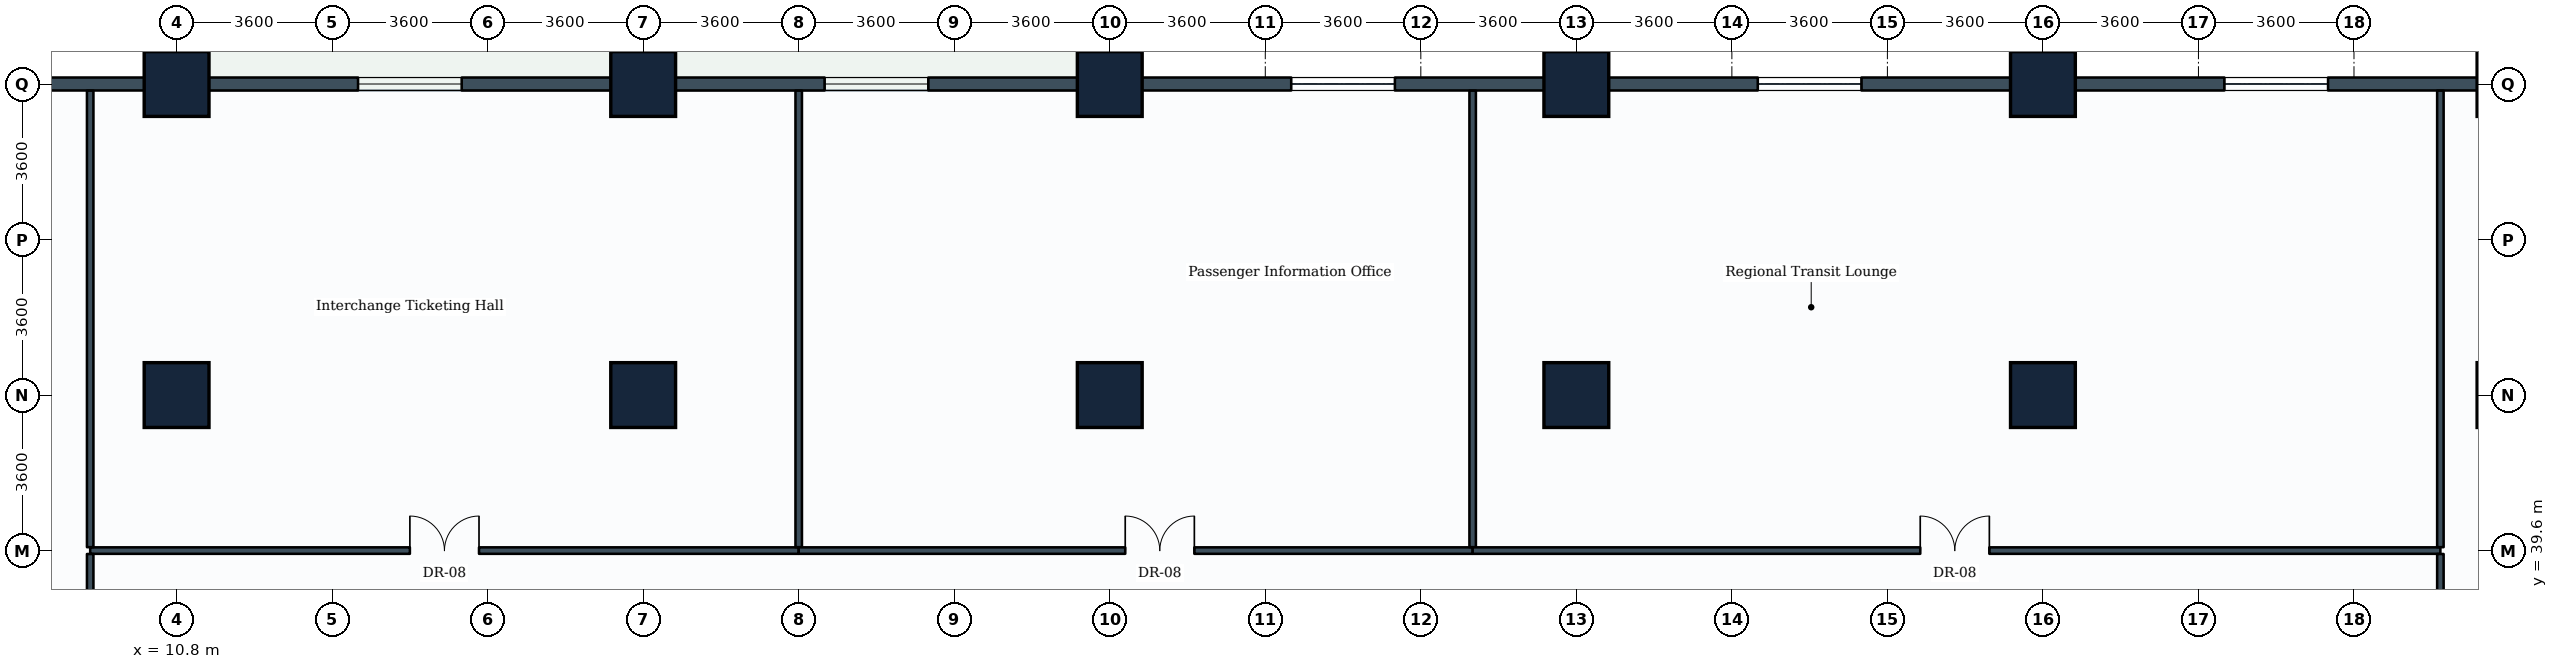
"""IFC4 building model, lengths in metres.
Left out: names, types, materials, properties, quantities, classifications, styles, units other than length and angle.
Written with IfcOpenShell. Run it as: python <this file> out.ifc"""

import sys

from ifc_helpers import new_model, si_unit, direction, frame, frame_2d, origin, origin_2d, place, context, subcontext, project, spatial, rectangle, extrude, element, fill, save


model = new_model("IFC4")
c1 = context("Model", 3, precision=1e-05, world=origin(), true_north=direction((0.0, 1.0)))
c2 = subcontext(c1, "Body", "Model", "MODEL_VIEW")
j1 = project(units=[si_unit("LENGTHUNIT", "METRE"), si_unit("PLANEANGLEUNIT", "RADIAN")], contexts=[c1])
p1 = place(None, origin())
s1 = spatial("IfcSite", under=j1, at=p1, CompositionType="ELEMENT")
p2 = place(p1, origin())
s2 = spatial("IfcBuilding", under=s1, at=p2, CompositionType="ELEMENT")
p3 = place(p2, frame((0.0, 0.0, 5.4)))
s3 = spatial("IfcBuildingStorey", under=s2, at=p3, CompositionType="ELEMENT", Elevation=5.4)
for number, where, z_axis, x_axis in (
    (1, (10.8, 43.2, 0.0), (0.0, 0.0, 1.0), (1.0, 0.0, 0.0)),
    (2, (10.8, 50.4, 0.0), (0.0, 0.0, 1.0), (1.0, 0.0, 0.0)),
    (3, (21.6, 43.2, 0.0), (0.0, 0.0, 1.0), (1.0, 0.0, 0.0)),
    (4, (21.6, 50.4, 0.0), (0.0, 0.0, 1.0), (1.0, 0.0, 0.0)),
    (5, (32.4, 43.2, 0.0), (0.0, 0.0, 1.0), (1.0, 0.0, 0.0)),
    (6, (32.4, 50.4, 0.0), (0.0, 0.0, 1.0), (1.0, 0.0, 0.0)),
    (7, (43.2, 43.2, 0.0), (0.0, 0.0, 1.0), (1.0, 0.0, 0.0)),
    (8, (43.2, 50.4, 0.0), (0.0, 0.0, 1.0), (1.0, 0.0, 0.0)),
    (9, (54.0, 43.2, 0.0), (0.0, 0.0, 1.0), (1.0, 0.0, 0.0)),
    (10, (54.0, 50.4, 0.0), (0.0, 0.0, 1.0), (1.0, 0.0, 0.0)),
    (11, (64.8, 43.2, 0.0), (0.0, 0.0, 1.0), (1.0, 0.0, 0.0)),
    (12, (64.8, 50.4, 0.0), (0.0, 0.0, 1.0), (1.0, 0.0, 0.0)),
):
    element("IfcColumn", number, at=place(p3, frame(where, z_axis=z_axis, x_axis=x_axis)), inside=s3, PredefinedType="COLUMN", context=c2, shape_type="SweptSolid", body=[
        extrude(rectangle(XDim=1.5, YDim=1.5, at=origin_2d()), origin(), (0.0, 0.0, 1.0), 4.8),
    ])
p4 = place(p3, frame((0.0, 50.4, 0.0), z_axis=(0.0, 0.0, 1.0), x_axis=(1.0, 0.0, 0.0)))
e13 = element("IfcWall", 13, at=p4, inside=s3, PredefinedType="STANDARD", context=c2, shape_type="SweptSolid", body=[
    extrude(rectangle(XDim=10.8, YDim=0.3, at=frame_2d((5.4, 0.0))), origin(), (0.0, 0.0, 1.0), 3.83),
])
p5 = place(p4, frame((4.2, 0.0, 0.85)))
e14 = element("IfcOpeningElement", 14, at=p5, cuts=e13, PredefinedType="OPENING", context=c2, shape_type="SweptSolid", body=[
    extrude(rectangle(XDim=2.4, YDim=1.6, at=frame_2d((1.2, 0.8))), frame((0.0, 0.16, 0.0), z_axis=(0.0, -1.0, 0.0), x_axis=(1.0, 0.0, 0.0)), (0.0, 0.0, 1.0), 0.32),
])
p6 = place(p3, frame((10.8, 50.4, 0.0), z_axis=(0.0, 0.0, 1.0), x_axis=(1.0, 0.0, 0.0)))
e15 = element("IfcWall", 15, at=p6, inside=s3, PredefinedType="STANDARD", context=c2, shape_type="SweptSolid", body=[
    extrude(rectangle(XDim=10.8, YDim=0.3, at=frame_2d((5.4, 0.0))), origin(), (0.0, 0.0, 1.0), 3.83),
])
p7 = place(p6, frame((4.2, 0.0, 0.85)))
e16 = element("IfcOpeningElement", 16, at=p7, cuts=e15, PredefinedType="OPENING", context=c2, shape_type="SweptSolid", body=[
    extrude(rectangle(XDim=2.4, YDim=1.6, at=frame_2d((1.2, 0.8))), frame((0.0, 0.16, 0.0), z_axis=(0.0, -1.0, 0.0), x_axis=(1.0, 0.0, 0.0)), (0.0, 0.0, 1.0), 0.32),
])
p8 = place(p3, frame((21.6, 50.4, 0.0), z_axis=(0.0, 0.0, 1.0), x_axis=(1.0, 0.0, 0.0)))
e17 = element("IfcWall", 17, at=p8, inside=s3, PredefinedType="STANDARD", context=c2, shape_type="SweptSolid", body=[
    extrude(rectangle(XDim=10.8, YDim=0.3, at=frame_2d((5.4, 0.0))), origin(), (0.0, 0.0, 1.0), 3.83),
])
p9 = place(p8, frame((4.2, 0.0, 0.85)))
e18 = element("IfcOpeningElement", 18, at=p9, cuts=e17, PredefinedType="OPENING", context=c2, shape_type="SweptSolid", body=[
    extrude(rectangle(XDim=2.4, YDim=1.6, at=frame_2d((1.2, 0.8))), frame((0.0, 0.16, 0.0), z_axis=(0.0, -1.0, 0.0), x_axis=(1.0, 0.0, 0.0)), (0.0, 0.0, 1.0), 0.32),
])
p10 = place(p3, frame((32.4, 50.4, 0.0), z_axis=(0.0, 0.0, 1.0), x_axis=(1.0, 0.0, 0.0)))
e19 = element("IfcWall", 19, at=p10, inside=s3, PredefinedType="STANDARD", context=c2, shape_type="SweptSolid", body=[
    extrude(rectangle(XDim=10.8, YDim=0.3, at=frame_2d((5.4, 0.0))), origin(), (0.0, 0.0, 1.0), 3.83),
])
p11 = place(p10, frame((4.2, 0.0, 0.85)))
e20 = element("IfcOpeningElement", 20, at=p11, cuts=e19, PredefinedType="OPENING", context=c2, shape_type="SweptSolid", body=[
    extrude(rectangle(XDim=2.4, YDim=1.6, at=frame_2d((1.2, 0.8))), frame((0.0, 0.16, 0.0), z_axis=(0.0, -1.0, 0.0), x_axis=(1.0, 0.0, 0.0)), (0.0, 0.0, 1.0), 0.32),
])
p12 = place(p3, frame((43.2, 50.4, 0.0), z_axis=(0.0, 0.0, 1.0), x_axis=(1.0, 0.0, 0.0)))
e21 = element("IfcWall", 21, at=p12, inside=s3, PredefinedType="STANDARD", context=c2, shape_type="SweptSolid", body=[
    extrude(rectangle(XDim=10.8, YDim=0.3, at=frame_2d((5.4, 0.0))), origin(), (0.0, 0.0, 1.0), 3.83),
])
p13 = place(p12, frame((4.2, 0.0, 0.85)))
e22 = element("IfcOpeningElement", 22, at=p13, cuts=e21, PredefinedType="OPENING", context=c2, shape_type="SweptSolid", body=[
    extrude(rectangle(XDim=2.4, YDim=1.6, at=frame_2d((1.2, 0.8))), frame((0.0, 0.16, 0.0), z_axis=(0.0, -1.0, 0.0), x_axis=(1.0, 0.0, 0.0)), (0.0, 0.0, 1.0), 0.32),
])
p14 = place(p3, frame((54.0, 50.4, 0.0), z_axis=(0.0, 0.0, 1.0), x_axis=(1.0, 0.0, 0.0)))
e23 = element("IfcWall", 23, at=p14, inside=s3, PredefinedType="STANDARD", context=c2, shape_type="SweptSolid", body=[
    extrude(rectangle(XDim=10.8, YDim=0.3, at=frame_2d((5.4, 0.0))), origin(), (0.0, 0.0, 1.0), 3.83),
])
p15 = place(p14, frame((4.2, 0.0, 0.85)))
e24 = element("IfcOpeningElement", 24, at=p15, cuts=e23, PredefinedType="OPENING", context=c2, shape_type="SweptSolid", body=[
    extrude(rectangle(XDim=2.4, YDim=1.6, at=frame_2d((1.2, 0.8))), frame((0.0, 0.16, 0.0), z_axis=(0.0, -1.0, 0.0), x_axis=(1.0, 0.0, 0.0)), (0.0, 0.0, 1.0), 0.32),
])
p16 = place(p3, frame((8.8, 39.6, 0.0), z_axis=(0.0, 0.0, 1.0), x_axis=(1.0, 0.0, 0.0)))
e25 = element("IfcWall", 25, at=p16, inside=s3, PredefinedType="PARTITIONING", context=c2, shape_type="SweptSolid", body=[
    extrude(rectangle(XDim=16.4, YDim=0.15, at=frame_2d((8.2, 0.0))), origin(), (0.0, 0.0, 1.0), 3.83),
])
p17 = place(p16, frame((7.4, 0.0, 0.0)))
e26 = element("IfcOpeningElement", 26, at=p17, cuts=e25, PredefinedType="OPENING", context=c2, shape_type="SweptSolid", body=[
    extrude(rectangle(XDim=1.6, YDim=2.2, at=frame_2d((0.8, 1.1))), frame((0.0, 0.085, 0.0), z_axis=(0.0, -1.0, 0.0), x_axis=(1.0, 0.0, 0.0)), (0.0, 0.0, 1.0), 0.17),
])
p18 = place(p3, frame((25.2, 39.679, 0.0), z_axis=(0.0, 0.0, 1.0), x_axis=(0.0, 1.0, 0.0)))
e27 = element("IfcWall", 27, at=p18, inside=s3, PredefinedType="PARTITIONING", context=c2, shape_type="SweptSolid", body=[
    extrude(rectangle(XDim=10.567, YDim=0.15, at=frame_2d((5.284, 0.0))), origin(), (0.0, 0.0, 1.0), 3.83),
])
p19 = place(p3, frame((25.2, 39.6, 0.0), z_axis=(0.0, 0.0, 1.0), x_axis=(1.0, 0.0, 0.0)))
e28 = element("IfcWall", 28, at=p19, inside=s3, PredefinedType="PARTITIONING", context=c2, shape_type="SweptSolid", body=[
    extrude(rectangle(XDim=15.6, YDim=0.15, at=frame_2d((7.8, 0.0))), origin(), (0.0, 0.0, 1.0), 3.83),
])
p20 = place(p19, frame((7.558, 0.0, 0.0)))
e29 = element("IfcOpeningElement", 29, at=p20, cuts=e28, PredefinedType="OPENING", context=c2, shape_type="SweptSolid", body=[
    extrude(rectangle(XDim=1.6, YDim=2.2, at=frame_2d((0.8, 1.1))), frame((0.0, 0.085, 0.0), z_axis=(0.0, -1.0, 0.0), x_axis=(1.0, 0.0, 0.0)), (0.0, 0.0, 1.0), 0.17),
])
p21 = place(p3, frame((40.8, 39.679, 0.0), z_axis=(0.0, 0.0, 1.0), x_axis=(0.0, 1.0, 0.0)))
e30 = element("IfcWall", 30, at=p21, inside=s3, PredefinedType="PARTITIONING", context=c2, shape_type="SweptSolid", body=[
    extrude(rectangle(XDim=10.567, YDim=0.15, at=frame_2d((5.284, 0.0))), origin(), (0.0, 0.0, 1.0), 3.83),
])
p22 = place(p3, frame((40.8, 39.6, 0.0), z_axis=(0.0, 0.0, 1.0), x_axis=(1.0, 0.0, 0.0)))
e31 = element("IfcWall", 31, at=p22, inside=s3, PredefinedType="PARTITIONING", context=c2, shape_type="SweptSolid", body=[
    extrude(rectangle(XDim=22.4, YDim=0.15, at=frame_2d((11.2, 0.0))), origin(), (0.0, 0.0, 1.0), 3.83),
])
p23 = place(p22, frame((10.36, 0.0, 0.0)))
e32 = element("IfcOpeningElement", 32, at=p23, cuts=e31, PredefinedType="OPENING", context=c2, shape_type="SweptSolid", body=[
    extrude(rectangle(XDim=1.6, YDim=2.2, at=frame_2d((0.8, 1.1))), frame((0.0, 0.085, 0.0), z_axis=(0.0, -1.0, 0.0), x_axis=(1.0, 0.0, 0.0)), (0.0, 0.0, 1.0), 0.17),
])
p24 = place(p3, frame((8.8, 35.4, 0.0), z_axis=(0.0, 0.0, 1.0), x_axis=(0.0, 1.0, 0.0)))
e33 = element("IfcWall", 33, at=p24, inside=s3, PredefinedType="PARTITIONING", context=c2, shape_type="SweptSolid", body=[
    extrude(rectangle(XDim=4.121, YDim=0.15, at=frame_2d((2.061, 0.0))), origin(), (0.0, 0.0, 1.0), 4.485),
])
p25 = place(p24, frame((1.561, 0.0, 0.0)))
e34 = element("IfcOpeningElement", 34, at=p25, cuts=e33, PredefinedType="OPENING", context=c2, shape_type="SweptSolid", body=[
    extrude(rectangle(XDim=1.0, YDim=2.1, at=frame_2d((0.5, 1.05))), frame((0.0, 0.085, 0.0), z_axis=(0.0, -1.0, 0.0), x_axis=(1.0, 0.0, 0.0)), (0.0, 0.0, 1.0), 0.17),
])
p26 = place(p3, frame((8.8, 39.679, 0.0), z_axis=(0.0, 0.0, 1.0), x_axis=(0.0, 1.0, 0.0)))
e35 = element("IfcWall", 35, at=p26, inside=s3, PredefinedType="PARTITIONING", context=c2, shape_type="SweptSolid", body=[
    extrude(rectangle(XDim=10.567, YDim=0.15, at=frame_2d((5.284, 0.0))), origin(), (0.0, 0.0, 1.0), 3.83),
])
p27 = place(p3, frame((63.2, 35.8, 0.0), z_axis=(0.0, 0.0, 1.0), x_axis=(0.0, 1.0, 0.0)))
e36 = element("IfcWall", 36, at=p27, inside=s3, PredefinedType="PARTITIONING", context=c2, shape_type="SweptSolid", body=[
    extrude(rectangle(XDim=3.721, YDim=0.15, at=frame_2d((1.86, 0.0))), origin(), (0.0, 0.0, 1.0), 4.485),
])
p28 = place(p27, frame((1.4, 0.0, 0.0)))
e37 = element("IfcOpeningElement", 37, at=p28, cuts=e36, PredefinedType="OPENING", context=c2, shape_type="SweptSolid", body=[
    extrude(rectangle(XDim=1.0, YDim=2.1, at=frame_2d((0.5, 1.05))), frame((0.0, 0.085, 0.0), z_axis=(0.0, -1.0, 0.0), x_axis=(1.0, 0.0, 0.0)), (0.0, 0.0, 1.0), 0.17),
])
p29 = place(p3, frame((63.2, 39.679, 0.0), z_axis=(0.0, 0.0, 1.0), x_axis=(0.0, 1.0, 0.0)))
e38 = element("IfcWall", 38, at=p29, inside=s3, PredefinedType="PARTITIONING", context=c2, shape_type="SweptSolid", body=[
    extrude(rectangle(XDim=10.567, YDim=0.15, at=frame_2d((5.284, 0.0))), origin(), (0.0, 0.0, 1.0), 3.83),
])
p30 = place(p7, origin())
e39 = element("IfcWindow", 39, at=p30, inside=s3, PartitioningType="SINGLE_PANEL", PredefinedType="WINDOW", context=c2, shape_type="SweptSolid", body=[
    extrude(rectangle(XDim=2.4, YDim=1.6, at=frame_2d((1.2, 0.8))), frame((0.0, 0.03, 0.0), z_axis=(0.0, -1.0, 0.0), x_axis=(1.0, 0.0, 0.0)), (0.0, 0.0, 1.0), 0.06),
])
fill(e16, e39)
p31 = place(p9, origin())
e40 = element("IfcWindow", 40, at=p31, inside=s3, PartitioningType="SINGLE_PANEL", PredefinedType="WINDOW", context=c2, shape_type="SweptSolid", body=[
    extrude(rectangle(XDim=2.4, YDim=1.6, at=frame_2d((1.2, 0.8))), frame((0.0, 0.03, 0.0), z_axis=(0.0, -1.0, 0.0), x_axis=(1.0, 0.0, 0.0)), (0.0, 0.0, 1.0), 0.06),
])
fill(e18, e40)
p32 = place(p11, origin())
e41 = element("IfcWindow", 41, at=p32, inside=s3, PartitioningType="SINGLE_PANEL", PredefinedType="WINDOW", context=c2, shape_type="SweptSolid", body=[
    extrude(rectangle(XDim=2.4, YDim=1.6, at=frame_2d((1.2, 0.8))), frame((0.0, 0.03, 0.0), z_axis=(0.0, -1.0, 0.0), x_axis=(1.0, 0.0, 0.0)), (0.0, 0.0, 1.0), 0.06),
])
fill(e20, e41)
p33 = place(p13, origin())
e42 = element("IfcWindow", 42, at=p33, inside=s3, PartitioningType="SINGLE_PANEL", PredefinedType="WINDOW", context=c2, shape_type="SweptSolid", body=[
    extrude(rectangle(XDim=2.4, YDim=1.6, at=frame_2d((1.2, 0.8))), frame((0.0, 0.03, 0.0), z_axis=(0.0, -1.0, 0.0), x_axis=(1.0, 0.0, 0.0)), (0.0, 0.0, 1.0), 0.06),
])
fill(e22, e42)
p34 = place(p15, origin())
e43 = element("IfcWindow", 43, at=p34, inside=s3, PartitioningType="SINGLE_PANEL", PredefinedType="WINDOW", context=c2, shape_type="SweptSolid", body=[
    extrude(rectangle(XDim=2.4, YDim=1.6, at=frame_2d((1.2, 0.8))), frame((0.0, 0.03, 0.0), z_axis=(0.0, -1.0, 0.0), x_axis=(1.0, 0.0, 0.0)), (0.0, 0.0, 1.0), 0.06),
])
fill(e24, e43)
p35 = place(p17, origin())
e44 = element("IfcDoor", 44, at=p35, inside=s3, OperationType="DOUBLE_DOOR_SINGLE_SWING", PredefinedType="DOOR", context=c2, shape_type="SweptSolid", body=[
    extrude(rectangle(XDim=1.6, YDim=2.2, at=frame_2d((0.8, 1.1))), frame((0.0, 0.025, 0.0), z_axis=(0.0, -1.0, 0.0), x_axis=(1.0, 0.0, 0.0)), (0.0, 0.0, 1.0), 0.05),
])
fill(e26, e44)
p36 = place(p20, origin())
e45 = element("IfcDoor", 45, at=p36, inside=s3, OperationType="DOUBLE_DOOR_SINGLE_SWING", PredefinedType="DOOR", context=c2, shape_type="SweptSolid", body=[
    extrude(rectangle(XDim=1.6, YDim=2.2, at=frame_2d((0.8, 1.1))), frame((0.0, 0.025, 0.0), z_axis=(0.0, -1.0, 0.0), x_axis=(1.0, 0.0, 0.0)), (0.0, 0.0, 1.0), 0.05),
])
fill(e29, e45)
p37 = place(p23, origin())
e46 = element("IfcDoor", 46, at=p37, inside=s3, OperationType="DOUBLE_DOOR_SINGLE_SWING", PredefinedType="DOOR", context=c2, shape_type="SweptSolid", body=[
    extrude(rectangle(XDim=1.6, YDim=2.2, at=frame_2d((0.8, 1.1))), frame((0.0, 0.025, 0.0), z_axis=(0.0, -1.0, 0.0), x_axis=(1.0, 0.0, 0.0)), (0.0, 0.0, 1.0), 0.05),
])
fill(e32, e46)
save(model, sys.argv[1])
